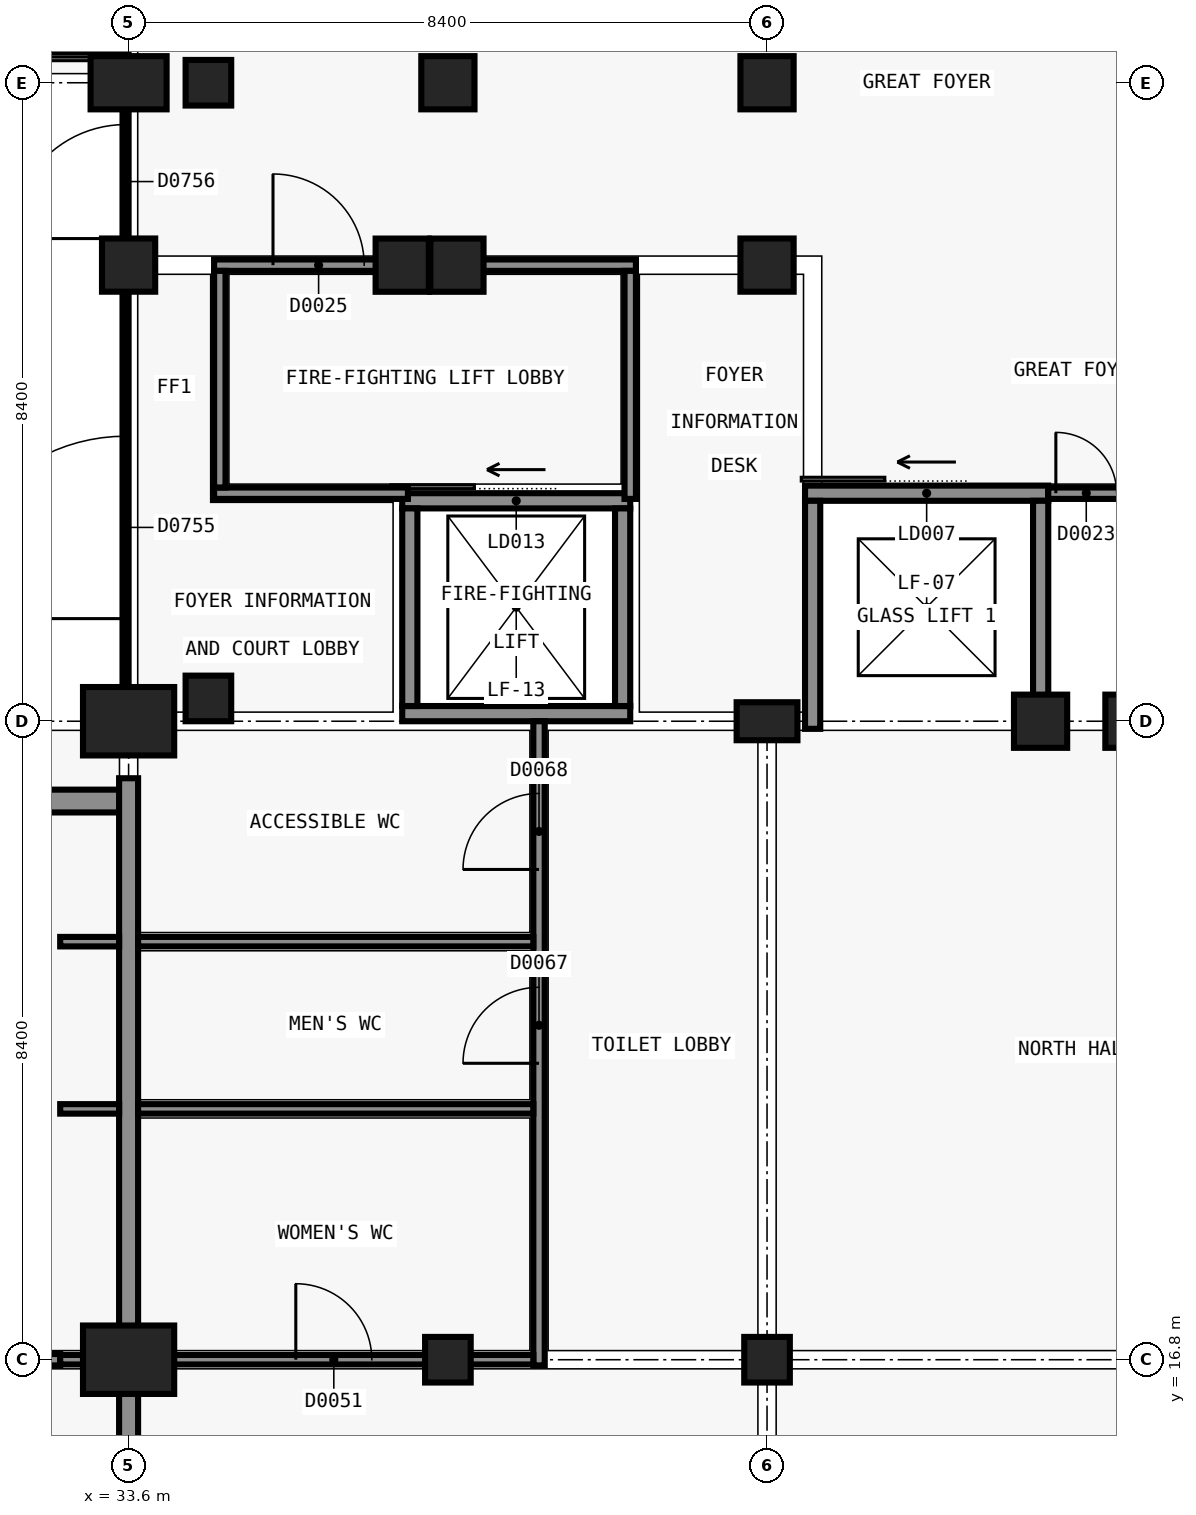
"""IFC4 building model, lengths in metres.
Left out: names, types, materials, properties, quantities, classifications, styles, units other than length and angle.
Written with IfcOpenShell. Run it as: python <this file> out.ifc"""

import sys

from ifc_helpers import new_model, si_unit, direction, frame, frame_2d, origin, origin_2d, place, context, subcontext, project, spatial, rectangle, extrude, element, fill, save


model = new_model("IFC4")
c1 = context("Model", 3, precision=1e-05, world=origin(), true_north=direction((0.0, 1.0)))
c2 = subcontext(c1, "Body", "Model", "MODEL_VIEW")
j1 = project(units=[si_unit("LENGTHUNIT", "METRE"), si_unit("PLANEANGLEUNIT", "RADIAN")], contexts=[c1])
p1 = place(None, origin())
s1 = spatial("IfcSite", under=j1, at=p1, CompositionType="ELEMENT")
p2 = place(p1, origin())
s2 = spatial("IfcBuilding", under=s1, at=p2, CompositionType="ELEMENT")
p3 = place(p2, origin())
s3 = spatial("IfcBuildingStorey", under=s2, at=p3, CompositionType="ELEMENT", Elevation=0.0)
p4 = place(p3, frame((40.2, 25.3, -1.6), z_axis=(0.0, 0.0, 1.0), x_axis=(-1.0, 0.0, 0.0)))
e1 = element("IfcWall", 1, at=p4, inside=s3, PredefinedType="SHEAR", context=c2, shape_type="SweptSolid", body=[
    extrude(rectangle(XDim=3.0, YDim=0.2, at=frame_2d((1.5, 0.0))), origin(), (0.0, 0.0, 1.0), 7.0),
])
p5 = place(p3, frame((37.2, 28.1, -1.6), z_axis=(0.0, 0.0, 1.0), x_axis=(1.0, 0.0, 0.0)))
e2 = element("IfcWall", 2, at=p5, inside=s3, PredefinedType="SHEAR", context=c2, shape_type="SweptSolid", body=[
    extrude(rectangle(XDim=3.0, YDim=0.2, at=frame_2d((1.5, 0.0))), origin(), (0.0, 0.0, 1.0), 7.0),
])
p6 = place(p5, frame((0.95, 0.0, 1.6)))
e3 = element("IfcOpeningElement", 3, at=p6, cuts=e2, PredefinedType="OPENING", context=c2, shape_type="SweptSolid", body=[
    extrude(rectangle(XDim=1.1, YDim=2.1, at=frame_2d((0.55, 1.05))), frame((0.0, 0.11, 0.0), z_axis=(0.0, -1.0, 0.0), x_axis=(1.0, 0.0, 0.0)), (0.0, 0.0, 1.0), 0.22),
])
for number, where, z_axis, x_axis in (
    (4, (37.3, 25.4, -1.6), (0.0, 0.0, 1.0), (0.0, 1.0, 0.0)),
    (5, (40.1, 28.0, -1.6), (0.0, 0.0, 1.0), (0.0, -1.0, 0.0)),
):
    element("IfcWall", number, at=place(p3, frame(where, z_axis=z_axis, x_axis=x_axis)), inside=s3, PredefinedType="SHEAR", context=c2, shape_type="SweptSolid", body=[
        extrude(rectangle(XDim=2.6, YDim=0.2, at=frame_2d((1.3, 0.0))), origin(), (0.0, 0.0, 1.0), 7.0),
    ])
for number, where, z_axis, x_axis in (
    (6, (33.6, 16.8, -0.3), (0.0, 0.0, 1.0), (0.0, 1.0, 0.0)),
    (7, (33.6, 25.2, -0.3), (0.0, 0.0, 1.0), (1.0, 0.0, 0.0)),
):
    element("IfcColumn", number, at=place(p3, frame(where, z_axis=z_axis, x_axis=x_axis)), inside=s3, PredefinedType="COLUMN", context=c2, shape_type="SweptSolid", body=[
        extrude(rectangle(XDim=1.2, YDim=0.9, at=origin_2d()), origin(), (0.0, 0.0, 1.0), 5.7),
    ])
p7 = place(p3, frame((42.0, 16.8, -0.3), z_axis=(0.0, 0.0, 1.0), x_axis=(1.0, 0.0, 0.0)))
e8 = element("IfcColumn", 8, at=p7, inside=s3, PredefinedType="COLUMN", context=c2, shape_type="SweptSolid", body=[
    extrude(rectangle(XDim=0.6, YDim=0.6, at=origin_2d()), origin(), (0.0, 0.0, 1.0), 5.7),
])
p8 = place(p3, frame((42.0, 25.2, -0.3), z_axis=(0.0, 0.0, 1.0), x_axis=(1.0, 0.0, 0.0)))
e9 = element("IfcColumn", 9, at=p8, inside=s3, PredefinedType="COLUMN", context=c2, shape_type="SweptSolid", body=[
    extrude(rectangle(XDim=0.8, YDim=0.5, at=origin_2d()), origin(), (0.0, 0.0, 1.0), 5.7),
])
p9 = place(p3, frame((33.6, 33.6, -0.3), z_axis=(0.0, 0.0, 1.0), x_axis=(1.0, 0.0, 0.0)))
e10 = element("IfcColumn", 10, at=p9, inside=s3, PredefinedType="COLUMN", context=c2, shape_type="SweptSolid", body=[
    extrude(rectangle(XDim=1.0, YDim=0.7, at=origin_2d()), origin(), (0.0, 0.0, 1.0), 5.7),
])
p10 = place(p3, frame((42.0, 33.6, -0.3), z_axis=(0.0, 0.0, 1.0), x_axis=(1.0, 0.0, 0.0)))
e11 = element("IfcColumn", 11, at=p10, inside=s3, PredefinedType="COLUMN", context=c2, shape_type="SweptSolid", body=[
    extrude(rectangle(XDim=0.7, YDim=0.7, at=origin_2d()), origin(), (0.0, 0.0, 1.0), 5.7),
])
for number, where, z_axis, x_axis in (
    (12, (34.65, 25.5, -0.3), (0.0, 0.0, 1.0), (1.0, 0.0, 0.0)),
    (13, (34.65, 33.6, -0.3), (0.0, 0.0, 1.0), (1.0, 0.0, 0.0)),
):
    element("IfcColumn", number, at=place(p3, frame(where, z_axis=z_axis, x_axis=x_axis)), inside=s3, PredefinedType="COLUMN", context=c2, shape_type="SweptSolid", body=[
        extrude(rectangle(XDim=0.6, YDim=0.6, at=origin_2d()), origin(), (0.0, 0.0, 1.0), 5.7),
    ])
for number, where, z_axis, x_axis in (
    (14, (33.6, 31.201, -0.3), (0.0, 0.0, 1.0), (1.0, 0.0, 0.0)),
    (15, (37.2, 31.2, -0.3), (0.0, 0.0, 1.0), (1.0, 0.0, 0.0)),
    (16, (42.0, 31.201, -0.3), (0.0, 0.0, 1.0), (1.0, 0.0, 0.0)),
    (17, (37.92, 31.2, -0.3), (0.0, 0.0, 1.0), (1.0, 0.0, 0.0)),
    (18, (37.801, 33.6, -0.3), (0.0, 0.0, 1.0), (1.0, 0.0, 0.0)),
    (19, (45.599, 25.2, -0.3), (0.0, 0.0, 1.0), (1.0, 0.0, 0.0)),
    (20, (46.801, 25.2, -0.3), (0.0, 0.0, 1.0), (1.0, 0.0, 0.0)),
):
    element("IfcColumn", number, at=place(p3, frame(where, z_axis=z_axis, x_axis=x_axis)), inside=s3, PredefinedType="COLUMN", context=c2, shape_type="SweptSolid", body=[
        extrude(rectangle(XDim=0.7, YDim=0.7, at=origin_2d()), origin(), (0.0, 0.0, 1.0), 5.7),
    ])
p11 = place(p3, frame((37.801, 16.8, -0.3), z_axis=(0.0, 0.0, 1.0), x_axis=(1.0, 0.0, 0.0)))
e21 = element("IfcColumn", 21, at=p11, inside=s3, PredefinedType="COLUMN", context=c2, shape_type="SweptSolid", body=[
    extrude(rectangle(XDim=0.6, YDim=0.6, at=origin_2d()), origin(), (0.0, 0.0, 1.0), 5.7),
])
p12 = place(p3, frame((31.5, 24.15, 0.0), z_axis=(0.0, 0.0, 1.0), x_axis=(1.0, 0.0, 0.0)))
e22 = element("IfcWall", 22, at=p12, inside=s3, PredefinedType="SOLIDWALL", context=c2, shape_type="SweptSolid", body=[
    extrude(rectangle(XDim=2.1, YDim=0.3, at=frame_2d((1.05, 0.0))), origin(), (0.0, 0.0, 1.0), 5.1),
])
p13 = place(p3, frame((33.56, 25.2, 0.0), z_axis=(0.0, 0.0, 1.0), x_axis=(0.0, 1.0, 0.0)))
e23 = element("IfcWall", 23, at=p13, inside=s3, PredefinedType="MOVABLE", context=c2, shape_type="SweptSolid", body=[
    extrude(rectangle(XDim=8.4, YDim=0.08, at=frame_2d((4.2, 0.0))), origin(), (0.0, 0.0, 1.0), 3.0),
])
p14 = place(p13, frame((1.35, 0.0, 0.0)))
e24 = element("IfcOpeningElement", 24, at=p14, cuts=e23, PredefinedType="OPENING", context=c2, shape_type="SweptSolid", body=[
    extrude(rectangle(XDim=2.4, YDim=2.4, at=frame_2d((1.2, 1.2))), frame((0.0, 0.05, 0.0), z_axis=(0.0, -1.0, 0.0), x_axis=(1.0, 0.0, 0.0)), (0.0, 0.0, 1.0), 0.1),
])
p15 = place(p13, frame((6.35, 0.0, 0.0)))
e25 = element("IfcOpeningElement", 25, at=p15, cuts=e23, PredefinedType="OPENING", context=c2, shape_type="SweptSolid", body=[
    extrude(rectangle(XDim=1.5, YDim=2.4, at=frame_2d((0.75, 1.2))), frame((0.0, 0.05, 0.0), z_axis=(0.0, -1.0, 0.0), x_axis=(1.0, 0.0, 0.0)), (0.0, 0.0, 1.0), 0.1),
])
p16 = place(p3, frame((33.6, 34.15, 0.0), z_axis=(0.0, 0.0, 1.0), x_axis=(-1.0, 0.0, 0.0)))
e26 = element("IfcWall", 26, at=p16, inside=s3, PredefinedType="SOLIDWALL", context=c2, shape_type="SweptSolid", body=[
    extrude(rectangle(XDim=12.6, YDim=0.3, at=frame_2d((6.3, 0.0))), origin(), (0.0, 0.0, 1.0), 5.1),
])
p17 = place(p16, frame((1.5, 0.0, 0.0)))
e27 = element("IfcOpeningElement", 27, at=p17, cuts=e26, PredefinedType="OPENING", context=c2, shape_type="SweptSolid", body=[
    extrude(rectangle(XDim=2.4, YDim=2.4, at=frame_2d((1.2, 1.2))), frame((0.0, 0.16, 0.0), z_axis=(0.0, -1.0, 0.0), x_axis=(1.0, 0.0, 0.0)), (0.0, 0.0, 1.0), 0.32),
])
p18 = place(p16, frame((9.9, 0.0, 1.5)))
e28 = element("IfcOpeningElement", 28, at=p18, cuts=e26, PredefinedType="OPENING", context=c2, shape_type="SweptSolid", body=[
    extrude(rectangle(XDim=1.2, YDim=0.9, at=frame_2d((0.6, 0.45))), frame((0.0, 0.16, 0.0), z_axis=(0.0, -1.0, 0.0), x_axis=(1.0, 0.0, 0.0)), (0.0, 0.0, 1.0), 0.32),
])
p19 = place(p16, frame((5.7, 0.0, 1.5)))
e29 = element("IfcOpeningElement", 29, at=p19, cuts=e26, PredefinedType="OPENING", context=c2, shape_type="SweptSolid", body=[
    extrude(rectangle(XDim=1.2, YDim=0.9, at=frame_2d((0.6, 0.45))), frame((0.0, 0.16, 0.0), z_axis=(0.0, -1.0, 0.0), x_axis=(1.0, 0.0, 0.0)), (0.0, 0.0, 1.0), 0.32),
])
p20 = place(p3, frame((33.6, 8.6, 0.0), z_axis=(0.0, 0.0, 1.0), x_axis=(0.0, 1.0, 0.0)))
e30 = element("IfcWall", 30, at=p20, inside=s3, PredefinedType="SOLIDWALL", context=c2, shape_type="SweptSolid", body=[
    extrude(rectangle(XDim=15.85, YDim=0.25, at=frame_2d((7.925, 0.0))), origin(), (0.0, 0.0, 1.0), 4.4),
])
p21 = place(p3, frame((42.5, 28.2, 0.0), z_axis=(0.0, 0.0, 1.0), x_axis=(1.0, 0.0, 0.0)))
e31 = element("IfcWall", 31, at=p21, inside=s3, PredefinedType="SHEAR", context=c2, shape_type="SweptSolid", body=[
    extrude(rectangle(XDim=3.2, YDim=0.2, at=frame_2d((1.6, 0.0))), origin(), (0.0, 0.0, 1.0), 5.1),
])
p22 = place(p21, frame((1.05, 0.0, 0.0)))
e32 = element("IfcOpeningElement", 32, at=p22, cuts=e31, PredefinedType="OPENING", context=c2, shape_type="SweptSolid", body=[
    extrude(rectangle(XDim=1.1, YDim=2.1, at=frame_2d((0.55, 1.05))), frame((0.0, 0.11, 0.0), z_axis=(0.0, -1.0, 0.0), x_axis=(1.0, 0.0, 0.0)), (0.0, 0.0, 1.0), 0.22),
])
for number, where, z_axis, x_axis in (
    (33, (42.6, 25.1, 0.0), (0.0, 0.0, 1.0), (0.0, 1.0, 0.0)),
    (34, (45.6, 25.1, 0.0), (0.0, 0.0, 1.0), (0.0, 1.0, 0.0)),
):
    element("IfcWall", number, at=place(p3, frame(where, z_axis=z_axis, x_axis=x_axis)), inside=s3, PredefinedType="SHEAR", context=c2, shape_type="SweptSolid", body=[
        extrude(rectangle(XDim=3.0, YDim=0.2, at=frame_2d((1.5, 0.0))), origin(), (0.0, 0.0, 1.0), 5.1),
    ])
p23 = place(p3, frame((25.125, 16.8, 0.0), z_axis=(0.0, 0.0, 1.0), x_axis=(1.0, 0.0, 0.0)))
e35 = element("IfcWall", 35, at=p23, inside=s3, PredefinedType="PARTITIONING", context=c2, shape_type="SweptSolid", body=[
    extrude(rectangle(XDim=7.575, YDim=0.15, at=frame_2d((3.788, 0.0))), origin(), (0.0, 0.0, 1.0), 4.4),
])
p24 = place(p23, frame((3.775, 0.0, 0.0)))
e36 = element("IfcOpeningElement", 36, at=p24, cuts=e35, PredefinedType="OPENING", context=c2, shape_type="SweptSolid", body=[
    extrude(rectangle(XDim=1.0, YDim=2.1, at=frame_2d((0.5, 1.05))), frame((0.0, 0.085, 0.0), z_axis=(0.0, -1.0, 0.0), x_axis=(1.0, 0.0, 0.0)), (0.0, 0.0, 1.0), 0.17),
])
p25 = place(p3, frame((34.725, 28.2, 0.0), z_axis=(0.0, 0.0, 1.0), x_axis=(1.0, 0.0, 0.0)))
e37 = element("IfcWall", 37, at=p25, inside=s3, PredefinedType="SOLIDWALL", context=c2, shape_type="SweptSolid", body=[
    extrude(rectangle(XDim=2.55, YDim=0.15, at=frame_2d((1.275, 0.0))), origin(), (0.0, 0.0, 1.0), 5.1),
])
p26 = place(p3, frame((34.725, 31.2, 0.0), z_axis=(0.0, 0.0, 1.0), x_axis=(1.0, 0.0, 0.0)))
e38 = element("IfcWall", 38, at=p26, inside=s3, PredefinedType="SOLIDWALL", context=c2, shape_type="SweptSolid", body=[
    extrude(rectangle(XDim=5.55, YDim=0.15, at=frame_2d((2.775, 0.0))), origin(), (0.0, 0.0, 1.0), 4.6),
])
p27 = place(p26, frame((0.775, 0.0, 0.0)))
e39 = element("IfcOpeningElement", 39, at=p27, cuts=e38, PredefinedType="OPENING", context=c2, shape_type="SweptSolid", body=[
    extrude(rectangle(XDim=1.2, YDim=2.1, at=frame_2d((0.6, 1.05))), frame((0.0, 0.085, 0.0), z_axis=(0.0, -1.0, 0.0), x_axis=(1.0, 0.0, 0.0)), (0.0, 0.0, 1.0), 0.17),
])
p28 = place(p3, frame((45.7, 28.2, 0.0), z_axis=(0.0, 0.0, 1.0), x_axis=(1.0, 0.0, 0.0)))
e40 = element("IfcWall", 40, at=p28, inside=s3, PredefinedType="SOLIDWALL", context=c2, shape_type="SweptSolid", body=[
    extrude(rectangle(XDim=1.0, YDim=0.15, at=frame_2d((0.5, 0.0))), origin(), (0.0, 0.0, 1.0), 5.1),
])
p29 = place(p28, frame((0.1, 0.0, 0.0)))
e41 = element("IfcOpeningElement", 41, at=p29, cuts=e40, PredefinedType="OPENING", context=c2, shape_type="SweptSolid", body=[
    extrude(rectangle(XDim=0.8, YDim=2.1, at=frame_2d((0.4, 1.05))), frame((0.0, 0.085, 0.0), z_axis=(0.0, -1.0, 0.0), x_axis=(1.0, 0.0, 0.0)), (0.0, 0.0, 1.0), 0.17),
])
p30 = place(p3, frame((39.0, 16.725, 0.0), z_axis=(0.0, 0.0, 1.0), x_axis=(0.0, 1.0, 0.0)))
e42 = element("IfcWall", 42, at=p30, inside=s3, PredefinedType="PARTITIONING", context=c2, shape_type="SweptSolid", body=[
    extrude(rectangle(XDim=8.475, YDim=0.15, at=frame_2d((4.237, 0.0))), origin(), (0.0, 0.0, 1.0), 4.6),
])
p31 = place(p30, frame((3.975, 0.0, 0.0)))
e43 = element("IfcOpeningElement", 43, at=p31, cuts=e42, PredefinedType="OPENING", context=c2, shape_type="SweptSolid", body=[
    extrude(rectangle(XDim=1.0, YDim=2.1, at=frame_2d((0.5, 1.05))), frame((0.0, 0.085, 0.0), z_axis=(0.0, -1.0, 0.0), x_axis=(1.0, 0.0, 0.0)), (0.0, 0.0, 1.0), 0.17),
])
p32 = place(p30, frame((6.525, 0.0, 0.0)))
e44 = element("IfcOpeningElement", 44, at=p32, cuts=e42, PredefinedType="OPENING", context=c2, shape_type="SweptSolid", body=[
    extrude(rectangle(XDim=1.0, YDim=2.1, at=frame_2d((0.5, 1.05))), frame((0.0, 0.085, 0.0), z_axis=(0.0, -1.0, 0.0), x_axis=(1.0, 0.0, 0.0)), (0.0, 0.0, 1.0), 0.17),
])
p33 = place(p3, frame((34.8, 28.275, 0.0), z_axis=(0.0, 0.0, 1.0), x_axis=(0.0, 1.0, 0.0)))
e45 = element("IfcWall", 45, at=p33, inside=s3, PredefinedType="SOLIDWALL", context=c2, shape_type="SweptSolid", body=[
    extrude(rectangle(XDim=2.85, YDim=0.15, at=frame_2d((1.425, 0.0))), origin(), (0.0, 0.0, 1.0), 5.1),
])
p34 = place(p3, frame((40.2, 28.125, 0.0), z_axis=(0.0, 0.0, 1.0), x_axis=(0.0, 1.0, 0.0)))
e46 = element("IfcWall", 46, at=p34, inside=s3, PredefinedType="SOLIDWALL", context=c2, shape_type="SweptSolid", body=[
    extrude(rectangle(XDim=3.0, YDim=0.15, at=frame_2d((1.5, 0.0))), origin(), (0.0, 0.0, 1.0), 4.6),
])
p35 = place(p3, frame((32.7, 16.8, 0.0), z_axis=(0.0, 0.0, 1.0), x_axis=(1.0, 0.0, 0.0)))
e47 = element("IfcWall", 47, at=p35, inside=s3, PredefinedType="PARTITIONING", context=c2, shape_type="SweptSolid", body=[
    extrude(rectangle(XDim=0.775, YDim=0.125, at=frame_2d((0.388, 0.0))), origin(), (0.0, 0.0, 1.0), 4.4),
])
p36 = place(p3, frame((33.725, 16.8, 0.0), z_axis=(0.0, 0.0, 1.0), x_axis=(1.0, 0.0, 0.0)))
e48 = element("IfcWall", 48, at=p36, inside=s3, PredefinedType="PARTITIONING", context=c2, shape_type="SweptSolid", body=[
    extrude(rectangle(XDim=5.2, YDim=0.125, at=frame_2d((2.6, 0.0))), origin(), (0.0, 0.0, 1.0), 4.4),
])
p37 = place(p36, frame((2.075, 0.0, 0.0)))
e49 = element("IfcOpeningElement", 49, at=p37, cuts=e48, PredefinedType="OPENING", context=c2, shape_type="SweptSolid", body=[
    extrude(rectangle(XDim=1.0, YDim=2.1, at=frame_2d((0.5, 1.05))), frame((0.0, 0.073, 0.0), z_axis=(0.0, -1.0, 0.0), x_axis=(1.0, 0.0, 0.0)), (0.0, 0.0, 1.0), 0.145),
])
p38 = place(p3, frame((32.7, 20.1, 0.0), z_axis=(0.0, 0.0, 1.0), x_axis=(1.0, 0.0, 0.0)))
e50 = element("IfcWall", 50, at=p38, inside=s3, PredefinedType="PARTITIONING", context=c2, shape_type="SweptSolid", body=[
    extrude(rectangle(XDim=0.775, YDim=0.125, at=frame_2d((0.388, 0.0))), origin(), (0.0, 0.0, 1.0), 4.4),
])
p39 = place(p3, frame((33.725, 20.1, 0.0), z_axis=(0.0, 0.0, 1.0), x_axis=(1.0, 0.0, 0.0)))
e51 = element("IfcWall", 51, at=p39, inside=s3, PredefinedType="PARTITIONING", context=c2, shape_type="SweptSolid", body=[
    extrude(rectangle(XDim=5.2, YDim=0.125, at=frame_2d((2.6, 0.0))), origin(), (0.0, 0.0, 1.0), 4.4),
])
p40 = place(p3, frame((32.7, 22.3, 0.0), z_axis=(0.0, 0.0, 1.0), x_axis=(1.0, 0.0, 0.0)))
e52 = element("IfcWall", 52, at=p40, inside=s3, PredefinedType="PARTITIONING", context=c2, shape_type="SweptSolid", body=[
    extrude(rectangle(XDim=0.775, YDim=0.125, at=frame_2d((0.388, 0.0))), origin(), (0.0, 0.0, 1.0), 4.4),
])
p41 = place(p3, frame((33.725, 22.3, 0.0), z_axis=(0.0, 0.0, 1.0), x_axis=(1.0, 0.0, 0.0)))
e53 = element("IfcWall", 53, at=p41, inside=s3, PredefinedType="PARTITIONING", context=c2, shape_type="SweptSolid", body=[
    extrude(rectangle(XDim=5.2, YDim=0.125, at=frame_2d((2.6, 0.0))), origin(), (0.0, 0.0, 1.0), 4.4),
])
p42 = place(p14, origin())
e54 = element("IfcDoor", 54, at=p42, inside=s3, OperationType="DOUBLE_DOOR_DOUBLE_SWING", PredefinedType="DOOR", context=c2, shape_type="SweptSolid", body=[
    extrude(rectangle(XDim=2.4, YDim=2.4, at=frame_2d((1.2, 1.2))), frame((0.0, 0.025, 0.0), z_axis=(0.0, -1.0, 0.0), x_axis=(1.0, 0.0, 0.0)), (0.0, 0.0, 1.0), 0.05),
])
fill(e24, e54)
p43 = place(p15, origin())
e55 = element("IfcDoor", 55, at=p43, inside=s3, OperationType="DOUBLE_DOOR_DOUBLE_SWING", PredefinedType="DOOR", context=c2, shape_type="SweptSolid", body=[
    extrude(rectangle(XDim=1.5, YDim=2.4, at=frame_2d((0.75, 1.2))), frame((0.0, 0.025, 0.0), z_axis=(0.0, -1.0, 0.0), x_axis=(1.0, 0.0, 0.0)), (0.0, 0.0, 1.0), 0.05),
])
fill(e25, e55)
p44 = place(p22, origin())
e56 = element("IfcDoor", 56, at=p44, inside=s3, OperationType="SLIDING_TO_LEFT", PredefinedType="DOOR", context=c2, shape_type="SweptSolid", body=[
    extrude(rectangle(XDim=1.1, YDim=2.1, at=frame_2d((0.55, 1.05))), frame((0.0, 0.025, 0.0), z_axis=(0.0, -1.0, 0.0), x_axis=(1.0, 0.0, 0.0)), (0.0, 0.0, 1.0), 0.05),
])
fill(e32, e56)
p45 = place(p6, origin())
e57 = element("IfcDoor", 57, at=p45, inside=s3, OperationType="SLIDING_TO_LEFT", PredefinedType="DOOR", context=c2, shape_type="SweptSolid", body=[
    extrude(rectangle(XDim=1.1, YDim=2.1, at=frame_2d((0.55, 1.05))), frame((0.0, 0.025, 0.0), z_axis=(0.0, -1.0, 0.0), x_axis=(1.0, 0.0, 0.0)), (0.0, 0.0, 1.0), 0.05),
])
fill(e3, e57)
p46 = place(p29, origin())
e58 = element("IfcDoor", 58, at=p46, inside=s3, OperationType="SINGLE_SWING_RIGHT", PredefinedType="DOOR", context=c2, shape_type="SweptSolid", body=[
    extrude(rectangle(XDim=0.8, YDim=2.1, at=frame_2d((0.4, 1.05))), frame((0.0, 0.025, 0.0), z_axis=(0.0, -1.0, 0.0), x_axis=(1.0, 0.0, 0.0)), (0.0, 0.0, 1.0), 0.05),
])
fill(e41, e58)
p47 = place(p27, origin())
e59 = element("IfcDoor", 59, at=p47, inside=s3, OperationType="SINGLE_SWING_LEFT", PredefinedType="DOOR", context=c2, shape_type="SweptSolid", body=[
    extrude(rectangle(XDim=1.2, YDim=2.1, at=frame_2d((0.6, 1.05))), frame((0.0, 0.025, 0.0), z_axis=(0.0, -1.0, 0.0), x_axis=(1.0, 0.0, 0.0)), (0.0, 0.0, 1.0), 0.05),
])
fill(e39, e59)
p48 = place(p37, origin())
e60 = element("IfcDoor", 60, at=p48, inside=s3, OperationType="SINGLE_SWING_LEFT", PredefinedType="DOOR", context=c2, shape_type="SweptSolid", body=[
    extrude(rectangle(XDim=1.0, YDim=2.1, at=frame_2d((0.5, 1.05))), frame((0.0, 0.025, 0.0), z_axis=(0.0, -1.0, 0.0), x_axis=(1.0, 0.0, 0.0)), (0.0, 0.0, 1.0), 0.05),
])
fill(e49, e60)
p49 = place(p31, origin())
e61 = element("IfcDoor", 61, at=p49, inside=s3, OperationType="SINGLE_SWING_RIGHT", PredefinedType="DOOR", context=c2, shape_type="SweptSolid", body=[
    extrude(rectangle(XDim=1.0, YDim=2.1, at=frame_2d((0.5, 1.05))), frame((0.0, 0.025, 0.0), z_axis=(0.0, -1.0, 0.0), x_axis=(1.0, 0.0, 0.0)), (0.0, 0.0, 1.0), 0.05),
])
fill(e43, e61)
p50 = place(p32, origin())
e62 = element("IfcDoor", 62, at=p50, inside=s3, OperationType="SINGLE_SWING_RIGHT", PredefinedType="DOOR", context=c2, shape_type="SweptSolid", body=[
    extrude(rectangle(XDim=1.0, YDim=2.1, at=frame_2d((0.5, 1.05))), frame((0.0, 0.025, 0.0), z_axis=(0.0, -1.0, 0.0), x_axis=(1.0, 0.0, 0.0)), (0.0, 0.0, 1.0), 0.05),
])
fill(e44, e62)
save(model, sys.argv[1])
